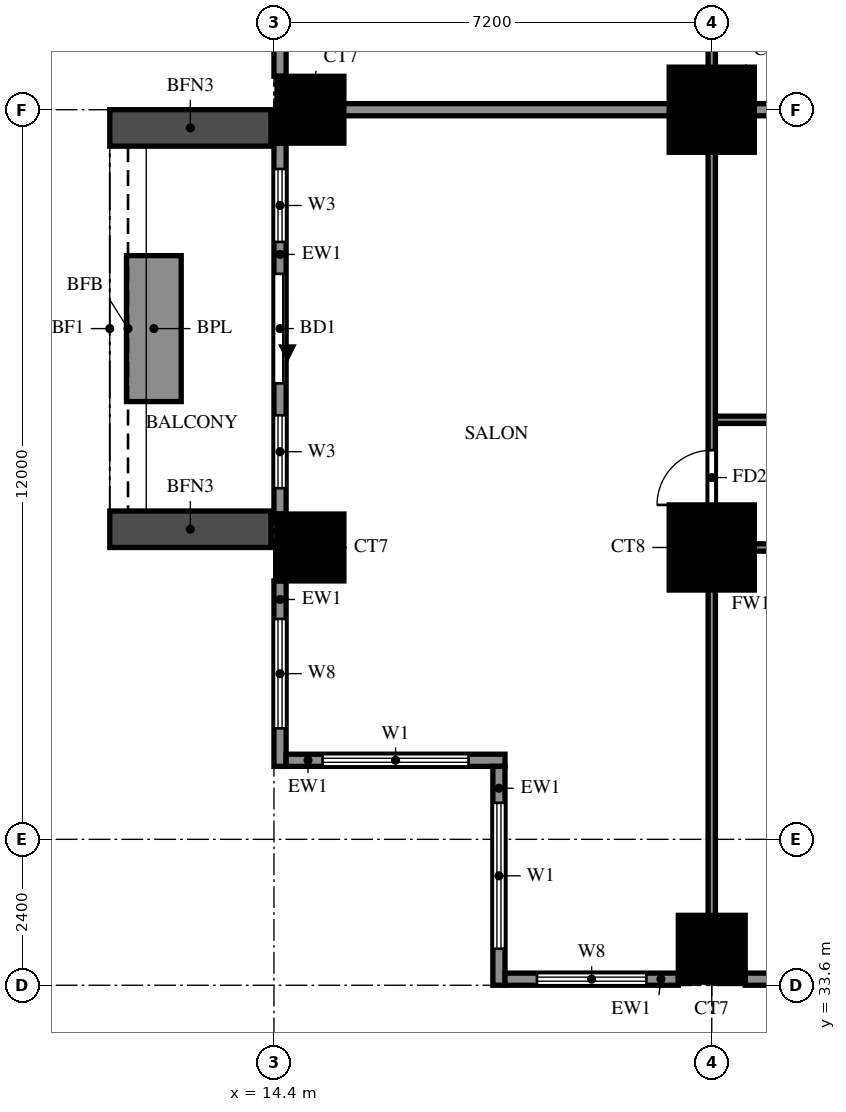
"""IFC4 building model, lengths in metres.
Left out: names, types, materials, properties, quantities, classifications, styles, units other than length and angle.
Written with IfcOpenShell. Run it as: python <this file> out.ifc"""

import sys

from ifc_helpers import new_model, si_unit, direction, frame, frame_2d, origin, origin_2d, place, context, subcontext, project, spatial, rectangle, extrude, source, transform, mapped, element, fill, save


model = new_model("IFC4")
c1 = context("Model", 3, precision=1e-05, world=origin(), true_north=direction((0.0, 1.0)))
c2 = subcontext(c1, "Body", "Model", "MODEL_VIEW")
j1 = project(units=[si_unit("LENGTHUNIT", "METRE"), si_unit("PLANEANGLEUNIT", "RADIAN")], contexts=[c1])
p1 = place(None, origin())
s1 = spatial("IfcSite", under=j1, at=p1, CompositionType="ELEMENT")
p2 = place(p1, origin())
s2 = spatial("IfcBuilding", under=s1, at=p2, CompositionType="ELEMENT")
p3 = place(p2, frame((0.0, 0.0, 48.0)))
s3 = spatial("IfcBuildingStorey", under=s2, at=p3, CompositionType="ELEMENT", Elevation=48.0)
m1 = source(origin(), c2, "Body", "SweptSolid", [
    extrude(rectangle(XDim=1.1, YDim=1.1, at=origin_2d()), origin(), (0.0, 0.0, 1.0), 3.18),
])
for number, where, z_axis, x_axis in (
    (1, (21.6, 34.2, 0.0), (0.0, 0.0, 1.0), (1.0, 0.0, 0.0)),
    (2, (15.0, 40.8, 0.0), (0.0, 0.0, 1.0), (1.0, 0.0, 0.0)),
):
    element("IfcColumn", number, at=place(p3, frame(where, z_axis=z_axis, x_axis=x_axis)), inside=s3, PredefinedType="COLUMN", context=c2, shape_type="MappedRepresentation", body=[
        mapped(m1, transform((0.0, 0.0, 0.0))),
    ])
m2 = source(origin(), c2, "Body", "SweptSolid", [
    extrude(rectangle(XDim=1.4, YDim=1.4, at=origin_2d()), origin(), (0.0, 0.0, 1.0), 3.18),
])
p4 = place(p3, frame((21.6, 40.8, 0.0), z_axis=(0.0, 0.0, 1.0), x_axis=(1.0, 0.0, 0.0)))
e3 = element("IfcColumn", 3, at=p4, inside=s3, PredefinedType="COLUMN", context=c2, shape_type="MappedRepresentation", body=[
    mapped(m2, transform((0.0, 0.0, 0.0))),
])
p5 = place(p3, frame((15.0, 48.0, 0.0), z_axis=(0.0, 0.0, 1.0), x_axis=(1.0, 0.0, 0.0)))
e4 = element("IfcColumn", 4, at=p5, inside=s3, PredefinedType="COLUMN", context=c2, shape_type="MappedRepresentation", body=[
    mapped(m1, transform((0.0, 0.0, 0.0))),
])
p6 = place(p3, frame((21.6, 48.0, 0.0), z_axis=(0.0, 0.0, 1.0), x_axis=(1.0, 0.0, 0.0)))
e5 = element("IfcColumn", 5, at=p6, inside=s3, PredefinedType="COLUMN", context=c2, shape_type="MappedRepresentation", body=[
    mapped(m2, transform((0.0, 0.0, 0.0))),
])
p7 = place(p3, frame((14.5, 54.65, 0.0), z_axis=(0.0, 0.0, 1.0), x_axis=(0.0, -1.0, 0.0)))
e6 = element("IfcWall", 6, at=p7, inside=s3, PredefinedType="SOLIDWALL", context=c2, shape_type="SweptSolid", body=[
    extrude(rectangle(XDim=6.1, YDim=0.2, at=frame_2d((3.05, 0.0))), origin(), (0.0, 0.0, 1.0), 3.18),
])
p8 = place(p7, frame((3.575, 0.0, 0.6)))
e7 = element("IfcOpeningElement", 7, at=p8, cuts=e6, PredefinedType="OPENING", context=c2, shape_type="SweptSolid", body=[
    extrude(rectangle(XDim=1.8, YDim=2.4, at=frame_2d((0.9, 1.2))), frame((0.0, 0.11, 0.0), z_axis=(0.0, -1.0, 0.0), x_axis=(1.0, 0.0, 0.0)), (0.0, 0.0, 1.0), 0.22),
])
p9 = place(p7, frame((0.725, 0.0, 0.6)))
e8 = element("IfcOpeningElement", 8, at=p9, cuts=e6, PredefinedType="OPENING", context=c2, shape_type="SweptSolid", body=[
    extrude(rectangle(XDim=1.8, YDim=2.4, at=frame_2d((0.9, 1.2))), frame((0.0, 0.11, 0.0), z_axis=(0.0, -1.0, 0.0), x_axis=(1.0, 0.0, 0.0)), (0.0, 0.0, 1.0), 0.22),
])
p10 = place(p3, frame((14.5, 47.45, 0.0), z_axis=(0.0, 0.0, 1.0), x_axis=(0.0, -1.0, 0.0)))
e9 = element("IfcWall", 9, at=p10, inside=s3, PredefinedType="SOLIDWALL", context=c2, shape_type="SweptSolid", body=[
    extrude(rectangle(XDim=6.1, YDim=0.2, at=frame_2d((3.05, 0.0))), origin(), (0.0, 0.0, 1.0), 3.18),
])
p11 = place(p10, frame((2.15, 0.0, 0.0)))
e10 = element("IfcOpeningElement", 10, at=p11, cuts=e9, PredefinedType="OPENING", context=c2, shape_type="SweptSolid", body=[
    extrude(rectangle(XDim=1.8, YDim=2.4, at=frame_2d((0.9, 1.2))), frame((0.0, 0.11, 0.0), z_axis=(0.0, -1.0, 0.0), x_axis=(1.0, 0.0, 0.0)), (0.0, 0.0, 1.0), 0.22),
])
p12 = place(p10, frame((0.425, 0.0, 0.6)))
e11 = element("IfcOpeningElement", 11, at=p12, cuts=e9, PredefinedType="OPENING", context=c2, shape_type="SweptSolid", body=[
    extrude(rectangle(XDim=1.2, YDim=2.4, at=frame_2d((0.6, 1.2))), frame((0.0, 0.11, 0.0), z_axis=(0.0, -1.0, 0.0), x_axis=(1.0, 0.0, 0.0)), (0.0, 0.0, 1.0), 0.22),
])
p13 = place(p10, frame((4.475, 0.0, 0.6)))
e12 = element("IfcOpeningElement", 12, at=p13, cuts=e9, PredefinedType="OPENING", context=c2, shape_type="SweptSolid", body=[
    extrude(rectangle(XDim=1.2, YDim=2.4, at=frame_2d((0.6, 1.2))), frame((0.0, 0.11, 0.0), z_axis=(0.0, -1.0, 0.0), x_axis=(1.0, 0.0, 0.0)), (0.0, 0.0, 1.0), 0.22),
])
p14 = place(p3, frame((14.5, 40.25, 0.0), z_axis=(0.0, 0.0, 1.0), x_axis=(0.0, -1.0, 0.0)))
e13 = element("IfcWall", 13, at=p14, inside=s3, PredefinedType="SOLIDWALL", context=c2, shape_type="SweptSolid", body=[
    extrude(rectangle(XDim=3.05, YDim=0.2, at=frame_2d((1.525, 0.0))), origin(), (0.0, 0.0, 1.0), 3.18),
])
p15 = place(p14, frame((0.625, 0.0, 0.6)))
e14 = element("IfcOpeningElement", 14, at=p15, cuts=e13, PredefinedType="OPENING", context=c2, shape_type="SweptSolid", body=[
    extrude(rectangle(XDim=1.8, YDim=2.4, at=frame_2d((0.9, 1.2))), frame((0.0, 0.11, 0.0), z_axis=(0.0, -1.0, 0.0), x_axis=(1.0, 0.0, 0.0)), (0.0, 0.0, 1.0), 0.22),
])
p16 = place(p3, frame((14.6, 37.3, 0.0), z_axis=(0.0, 0.0, 1.0), x_axis=(1.0, 0.0, 0.0)))
e15 = element("IfcWall", 15, at=p16, inside=s3, PredefinedType="SOLIDWALL", context=c2, shape_type="SweptSolid", body=[
    extrude(rectangle(XDim=3.6, YDim=0.2, at=frame_2d((1.8, 0.0))), origin(), (0.0, 0.0, 1.0), 3.18),
])
p17 = place(p16, frame((0.6, 0.0, 0.6)))
e16 = element("IfcOpeningElement", 16, at=p17, cuts=e15, PredefinedType="OPENING", context=c2, shape_type="SweptSolid", body=[
    extrude(rectangle(XDim=2.4, YDim=2.4, at=frame_2d((1.2, 1.2))), frame((0.0, 0.11, 0.0), z_axis=(0.0, -1.0, 0.0), x_axis=(1.0, 0.0, 0.0)), (0.0, 0.0, 1.0), 0.22),
])
p18 = place(p3, frame((18.1, 37.2, 0.0), z_axis=(0.0, 0.0, 1.0), x_axis=(0.0, -1.0, 0.0)))
e17 = element("IfcWall", 17, at=p18, inside=s3, PredefinedType="SOLIDWALL", context=c2, shape_type="SweptSolid", body=[
    extrude(rectangle(XDim=3.6, YDim=0.2, at=frame_2d((1.8, 0.0))), origin(), (0.0, 0.0, 1.0), 3.18),
])
p19 = place(p18, frame((0.6, 0.0, 0.6)))
e18 = element("IfcOpeningElement", 18, at=p19, cuts=e17, PredefinedType="OPENING", context=c2, shape_type="SweptSolid", body=[
    extrude(rectangle(XDim=2.4, YDim=2.4, at=frame_2d((1.2, 1.2))), frame((0.0, 0.11, 0.0), z_axis=(0.0, -1.0, 0.0), x_axis=(1.0, 0.0, 0.0)), (0.0, 0.0, 1.0), 0.22),
])
p20 = place(p3, frame((18.2, 33.7, 0.0), z_axis=(0.0, 0.0, 1.0), x_axis=(1.0, 0.0, 0.0)))
e19 = element("IfcWall", 19, at=p20, inside=s3, PredefinedType="SOLIDWALL", context=c2, shape_type="SweptSolid", body=[
    extrude(rectangle(XDim=2.85, YDim=0.2, at=frame_2d((1.425, 0.0))), origin(), (0.0, 0.0, 1.0), 3.18),
])
p21 = place(p20, frame((0.525, 0.0, 0.6)))
e20 = element("IfcOpeningElement", 20, at=p21, cuts=e19, PredefinedType="OPENING", context=c2, shape_type="SweptSolid", body=[
    extrude(rectangle(XDim=1.8, YDim=2.4, at=frame_2d((0.9, 1.2))), frame((0.0, 0.11, 0.0), z_axis=(0.0, -1.0, 0.0), x_axis=(1.0, 0.0, 0.0)), (0.0, 0.0, 1.0), 0.22),
])
p22 = place(p3, frame((22.15, 33.7, 0.0), z_axis=(0.0, 0.0, 1.0), x_axis=(1.0, 0.0, 0.0)))
e21 = element("IfcWall", 21, at=p22, inside=s3, PredefinedType="SOLIDWALL", context=c2, shape_type="SweptSolid", body=[
    extrude(rectangle(XDim=6.1, YDim=0.2, at=frame_2d((3.05, 0.0))), origin(), (0.0, 0.0, 1.0), 3.18),
])
p23 = place(p22, frame((0.725, 0.0, 0.6)))
e22 = element("IfcOpeningElement", 22, at=p23, cuts=e21, PredefinedType="OPENING", context=c2, shape_type="SweptSolid", body=[
    extrude(rectangle(XDim=1.8, YDim=2.4, at=frame_2d((0.9, 1.2))), frame((0.0, 0.11, 0.0), z_axis=(0.0, -1.0, 0.0), x_axis=(1.0, 0.0, 0.0)), (0.0, 0.0, 1.0), 0.22),
])
p24 = place(p22, frame((4.025, 0.0, 1.5)))
e23 = element("IfcOpeningElement", 23, at=p24, cuts=e21, PredefinedType="OPENING", context=c2, shape_type="SweptSolid", body=[
    extrude(rectangle(XDim=0.9, YDim=0.9, at=frame_2d((0.45, 0.45))), frame((0.0, 0.11, 0.0), z_axis=(0.0, -1.0, 0.0), x_axis=(1.0, 0.0, 0.0)), (0.0, 0.0, 1.0), 0.22),
])
for number, where, z_axis, x_axis in (
    (24, (14.35, 47.7, 0.0), (0.0, 0.0, 1.0), (-1.0, 0.0, 0.0)),
    (25, (14.35, 41.1, 0.0), (0.0, 0.0, 1.0), (-1.0, 0.0, 0.0)),
):
    element("IfcWall", number, at=place(p3, frame(where, z_axis=z_axis, x_axis=x_axis)), inside=s3, PredefinedType="SOLIDWALL", context=c2, shape_type="SweptSolid", body=[
        extrude(rectangle(XDim=2.65, YDim=0.6, at=frame_2d((1.325, 0.0))), origin(), (0.0, 0.0, 1.0), 2.85),
    ])
p25 = place(p3, frame((12.425, 45.6, 0.0), z_axis=(0.0, 0.0, 1.0), x_axis=(0.0, -1.0, 0.0)))
e26 = element("IfcWall", 26, at=p25, inside=s3, PredefinedType="SOLIDWALL", context=c2, shape_type="SweptSolid", body=[
    extrude(rectangle(XDim=2.4, YDim=0.9, at=frame_2d((1.2, 0.0))), origin(), (0.0, 0.0, 1.0), 0.9),
])
p26 = place(p3, frame((14.525, 48.0, 0.0), z_axis=(0.0, 0.0, 1.0), x_axis=(1.0, 0.0, 0.0)))
e27 = element("IfcWall", 27, at=p26, inside=s3, PredefinedType="SOLIDWALL", context=c2, shape_type="SweptSolid", body=[
    extrude(rectangle(XDim=19.075, YDim=0.2, at=frame_2d((9.538, 0.0))), origin(), (0.0, 0.0, 1.0), 3.18),
])
p27 = place(p3, frame((21.6, 40.8, 0.0), z_axis=(0.0, 0.0, 1.0), x_axis=(1.0, 0.0, 0.0)))
e28 = element("IfcWall", 28, at=p27, inside=s3, PredefinedType="PARTITIONING", context=c2, shape_type="SweptSolid", body=[
    extrude(rectangle(XDim=3.6, YDim=0.12, at=frame_2d((1.8, 0.0))), origin(), (0.0, 0.0, 1.0), 3.18),
])
p28 = place(p27, frame((1.35, 0.0, 0.0)))
e29 = element("IfcOpeningElement", 29, at=p28, cuts=e28, PredefinedType="OPENING", context=c2, shape_type="SweptSolid", body=[
    extrude(rectangle(XDim=0.9, YDim=2.1, at=frame_2d((0.45, 1.05))), frame((0.0, 0.07, 0.0), z_axis=(0.0, -1.0, 0.0), x_axis=(1.0, 0.0, 0.0)), (0.0, 0.0, 1.0), 0.14),
])
p29 = place(p3, frame((21.6, 42.9, 0.0), z_axis=(0.0, 0.0, 1.0), x_axis=(1.0, 0.0, 0.0)))
e30 = element("IfcWall", 30, at=p29, inside=s3, PredefinedType="PARTITIONING", context=c2, shape_type="SweptSolid", body=[
    extrude(rectangle(XDim=14.4, YDim=0.12, at=frame_2d((7.2, 0.0))), origin(), (0.0, 0.0, 1.0), 3.18),
])
p30 = place(p29, frame((2.1, 0.0, 0.0)))
e31 = element("IfcOpeningElement", 31, at=p30, cuts=e30, PredefinedType="OPENING", context=c2, shape_type="SweptSolid", body=[
    extrude(rectangle(XDim=0.9, YDim=2.1, at=frame_2d((0.45, 1.05))), frame((0.0, 0.07, 0.0), z_axis=(0.0, -1.0, 0.0), x_axis=(1.0, 0.0, 0.0)), (0.0, 0.0, 1.0), 0.14),
])
p31 = place(p29, frame((5.85, 0.0, 0.0)))
e32 = element("IfcOpeningElement", 32, at=p31, cuts=e30, PredefinedType="OPENING", context=c2, shape_type="SweptSolid", body=[
    extrude(rectangle(XDim=0.8, YDim=2.1, at=frame_2d((0.4, 1.05))), frame((0.0, 0.07, 0.0), z_axis=(0.0, -1.0, 0.0), x_axis=(1.0, 0.0, 0.0)), (0.0, 0.0, 1.0), 0.14),
])
p32 = place(p29, frame((9.25, 0.0, 0.0)))
e33 = element("IfcOpeningElement", 33, at=p32, cuts=e30, PredefinedType="OPENING", context=c2, shape_type="SweptSolid", body=[
    extrude(rectangle(XDim=0.9, YDim=2.1, at=frame_2d((0.45, 1.05))), frame((0.0, 0.07, 0.0), z_axis=(0.0, -1.0, 0.0), x_axis=(1.0, 0.0, 0.0)), (0.0, 0.0, 1.0), 0.14),
])
p33 = place(p3, frame((21.6, 33.725, 0.0), z_axis=(0.0, 0.0, 1.0), x_axis=(0.0, 1.0, 0.0)))
e34 = element("IfcWall", 34, at=p33, inside=s3, PredefinedType="PARTITIONING", context=c2, shape_type="SweptSolid", body=[
    extrude(rectangle(XDim=35.875, YDim=0.12, at=frame_2d((17.938, 0.0))), origin(), (0.0, 0.0, 1.0), 3.18),
])
p34 = place(p33, frame((7.775, 0.0, 0.0)))
e35 = element("IfcOpeningElement", 35, at=p34, cuts=e34, PredefinedType="OPENING", context=c2, shape_type="SweptSolid", body=[
    extrude(rectangle(XDim=0.9, YDim=2.1, at=frame_2d((0.45, 1.05))), frame((0.0, 0.07, 0.0), z_axis=(0.0, -1.0, 0.0), x_axis=(1.0, 0.0, 0.0)), (0.0, 0.0, 1.0), 0.14),
])
p35 = place(p33, frame((15.625, 0.0, 0.0)))
e36 = element("IfcOpeningElement", 36, at=p35, cuts=e34, PredefinedType="OPENING", context=c2, shape_type="SweptSolid", body=[
    extrude(rectangle(XDim=0.9, YDim=2.1, at=frame_2d((0.45, 1.05))), frame((0.0, 0.07, 0.0), z_axis=(0.0, -1.0, 0.0), x_axis=(1.0, 0.0, 0.0)), (0.0, 0.0, 1.0), 0.14),
])
p36 = place(p33, frame((22.225, 0.0, 0.0)))
e37 = element("IfcOpeningElement", 37, at=p36, cuts=e34, PredefinedType="OPENING", context=c2, shape_type="SweptSolid", body=[
    extrude(rectangle(XDim=1.5, YDim=2.1, at=frame_2d((0.75, 1.05))), frame((0.0, 0.07, 0.0), z_axis=(0.0, -1.0, 0.0), x_axis=(1.0, 0.0, 0.0)), (0.0, 0.0, 1.0), 0.14),
])
p37 = place(p33, frame((26.425, 0.0, 0.0)))
e38 = element("IfcOpeningElement", 38, at=p37, cuts=e34, PredefinedType="OPENING", context=c2, shape_type="SweptSolid", body=[
    extrude(rectangle(XDim=0.9, YDim=2.1, at=frame_2d((0.45, 1.05))), frame((0.0, 0.07, 0.0), z_axis=(0.0, -1.0, 0.0), x_axis=(1.0, 0.0, 0.0)), (0.0, 0.0, 1.0), 0.14),
])
p38 = place(p33, frame((31.825, 0.0, 0.0)))
e39 = element("IfcOpeningElement", 39, at=p38, cuts=e34, PredefinedType="OPENING", context=c2, shape_type="SweptSolid", body=[
    extrude(rectangle(XDim=0.9, YDim=2.1, at=frame_2d((0.45, 1.05))), frame((0.0, 0.07, 0.0), z_axis=(0.0, -1.0, 0.0), x_axis=(1.0, 0.0, 0.0)), (0.0, 0.0, 1.0), 0.14),
])
p39 = place(p11, origin())
e40 = element("IfcDoor", 40, at=p39, inside=s3, OperationType="DOUBLE_DOOR_SLIDING", PredefinedType="DOOR", context=c2, shape_type="SweptSolid", body=[
    extrude(rectangle(XDim=1.8, YDim=2.4, at=frame_2d((0.9, 1.2))), frame((0.0, 0.025, 0.0), z_axis=(0.0, -1.0, 0.0), x_axis=(1.0, 0.0, 0.0)), (0.0, 0.0, 1.0), 0.05),
])
fill(e10, e40)
p40 = place(p12, origin())
e41 = element("IfcWindow", 41, at=p40, inside=s3, PartitioningType="SINGLE_PANEL", PredefinedType="WINDOW", context=c2, shape_type="SweptSolid", body=[
    extrude(rectangle(XDim=1.2, YDim=2.4, at=frame_2d((0.6, 1.2))), frame((0.0, 0.03, 0.0), z_axis=(0.0, -1.0, 0.0), x_axis=(1.0, 0.0, 0.0)), (0.0, 0.0, 1.0), 0.06),
])
fill(e11, e41)
p41 = place(p13, origin())
e42 = element("IfcWindow", 42, at=p41, inside=s3, PartitioningType="SINGLE_PANEL", PredefinedType="WINDOW", context=c2, shape_type="SweptSolid", body=[
    extrude(rectangle(XDim=1.2, YDim=2.4, at=frame_2d((0.6, 1.2))), frame((0.0, 0.03, 0.0), z_axis=(0.0, -1.0, 0.0), x_axis=(1.0, 0.0, 0.0)), (0.0, 0.0, 1.0), 0.06),
])
fill(e12, e42)
p42 = place(p15, origin())
e43 = element("IfcWindow", 43, at=p42, inside=s3, PartitioningType="DOUBLE_PANEL_VERTICAL", PredefinedType="WINDOW", context=c2, shape_type="SweptSolid", body=[
    extrude(rectangle(XDim=1.8, YDim=2.4, at=frame_2d((0.9, 1.2))), frame((0.0, 0.03, 0.0), z_axis=(0.0, -1.0, 0.0), x_axis=(1.0, 0.0, 0.0)), (0.0, 0.0, 1.0), 0.06),
])
fill(e14, e43)
p43 = place(p17, origin())
e44 = element("IfcWindow", 44, at=p43, inside=s3, PartitioningType="DOUBLE_PANEL_VERTICAL", PredefinedType="WINDOW", context=c2, shape_type="SweptSolid", body=[
    extrude(rectangle(XDim=2.4, YDim=2.4, at=frame_2d((1.2, 1.2))), frame((0.0, 0.03, 0.0), z_axis=(0.0, -1.0, 0.0), x_axis=(1.0, 0.0, 0.0)), (0.0, 0.0, 1.0), 0.06),
])
fill(e16, e44)
p44 = place(p19, origin())
e45 = element("IfcWindow", 45, at=p44, inside=s3, PartitioningType="DOUBLE_PANEL_VERTICAL", PredefinedType="WINDOW", context=c2, shape_type="SweptSolid", body=[
    extrude(rectangle(XDim=2.4, YDim=2.4, at=frame_2d((1.2, 1.2))), frame((0.0, 0.03, 0.0), z_axis=(0.0, -1.0, 0.0), x_axis=(1.0, 0.0, 0.0)), (0.0, 0.0, 1.0), 0.06),
])
fill(e18, e45)
p45 = place(p21, origin())
e46 = element("IfcWindow", 46, at=p45, inside=s3, PartitioningType="DOUBLE_PANEL_VERTICAL", PredefinedType="WINDOW", context=c2, shape_type="SweptSolid", body=[
    extrude(rectangle(XDim=1.8, YDim=2.4, at=frame_2d((0.9, 1.2))), frame((0.0, 0.03, 0.0), z_axis=(0.0, -1.0, 0.0), x_axis=(1.0, 0.0, 0.0)), (0.0, 0.0, 1.0), 0.06),
])
fill(e20, e46)
p46 = place(p34, origin())
e47 = element("IfcDoor", 47, at=p46, inside=s3, OperationType="SINGLE_SWING_LEFT", PredefinedType="DOOR", context=c2, shape_type="SweptSolid", body=[
    extrude(rectangle(XDim=0.9, YDim=2.1, at=frame_2d((0.45, 1.05))), frame((0.0, 0.025, 0.0), z_axis=(0.0, -1.0, 0.0), x_axis=(1.0, 0.0, 0.0)), (0.0, 0.0, 1.0), 0.05),
])
fill(e35, e47)
save(model, sys.argv[1])
